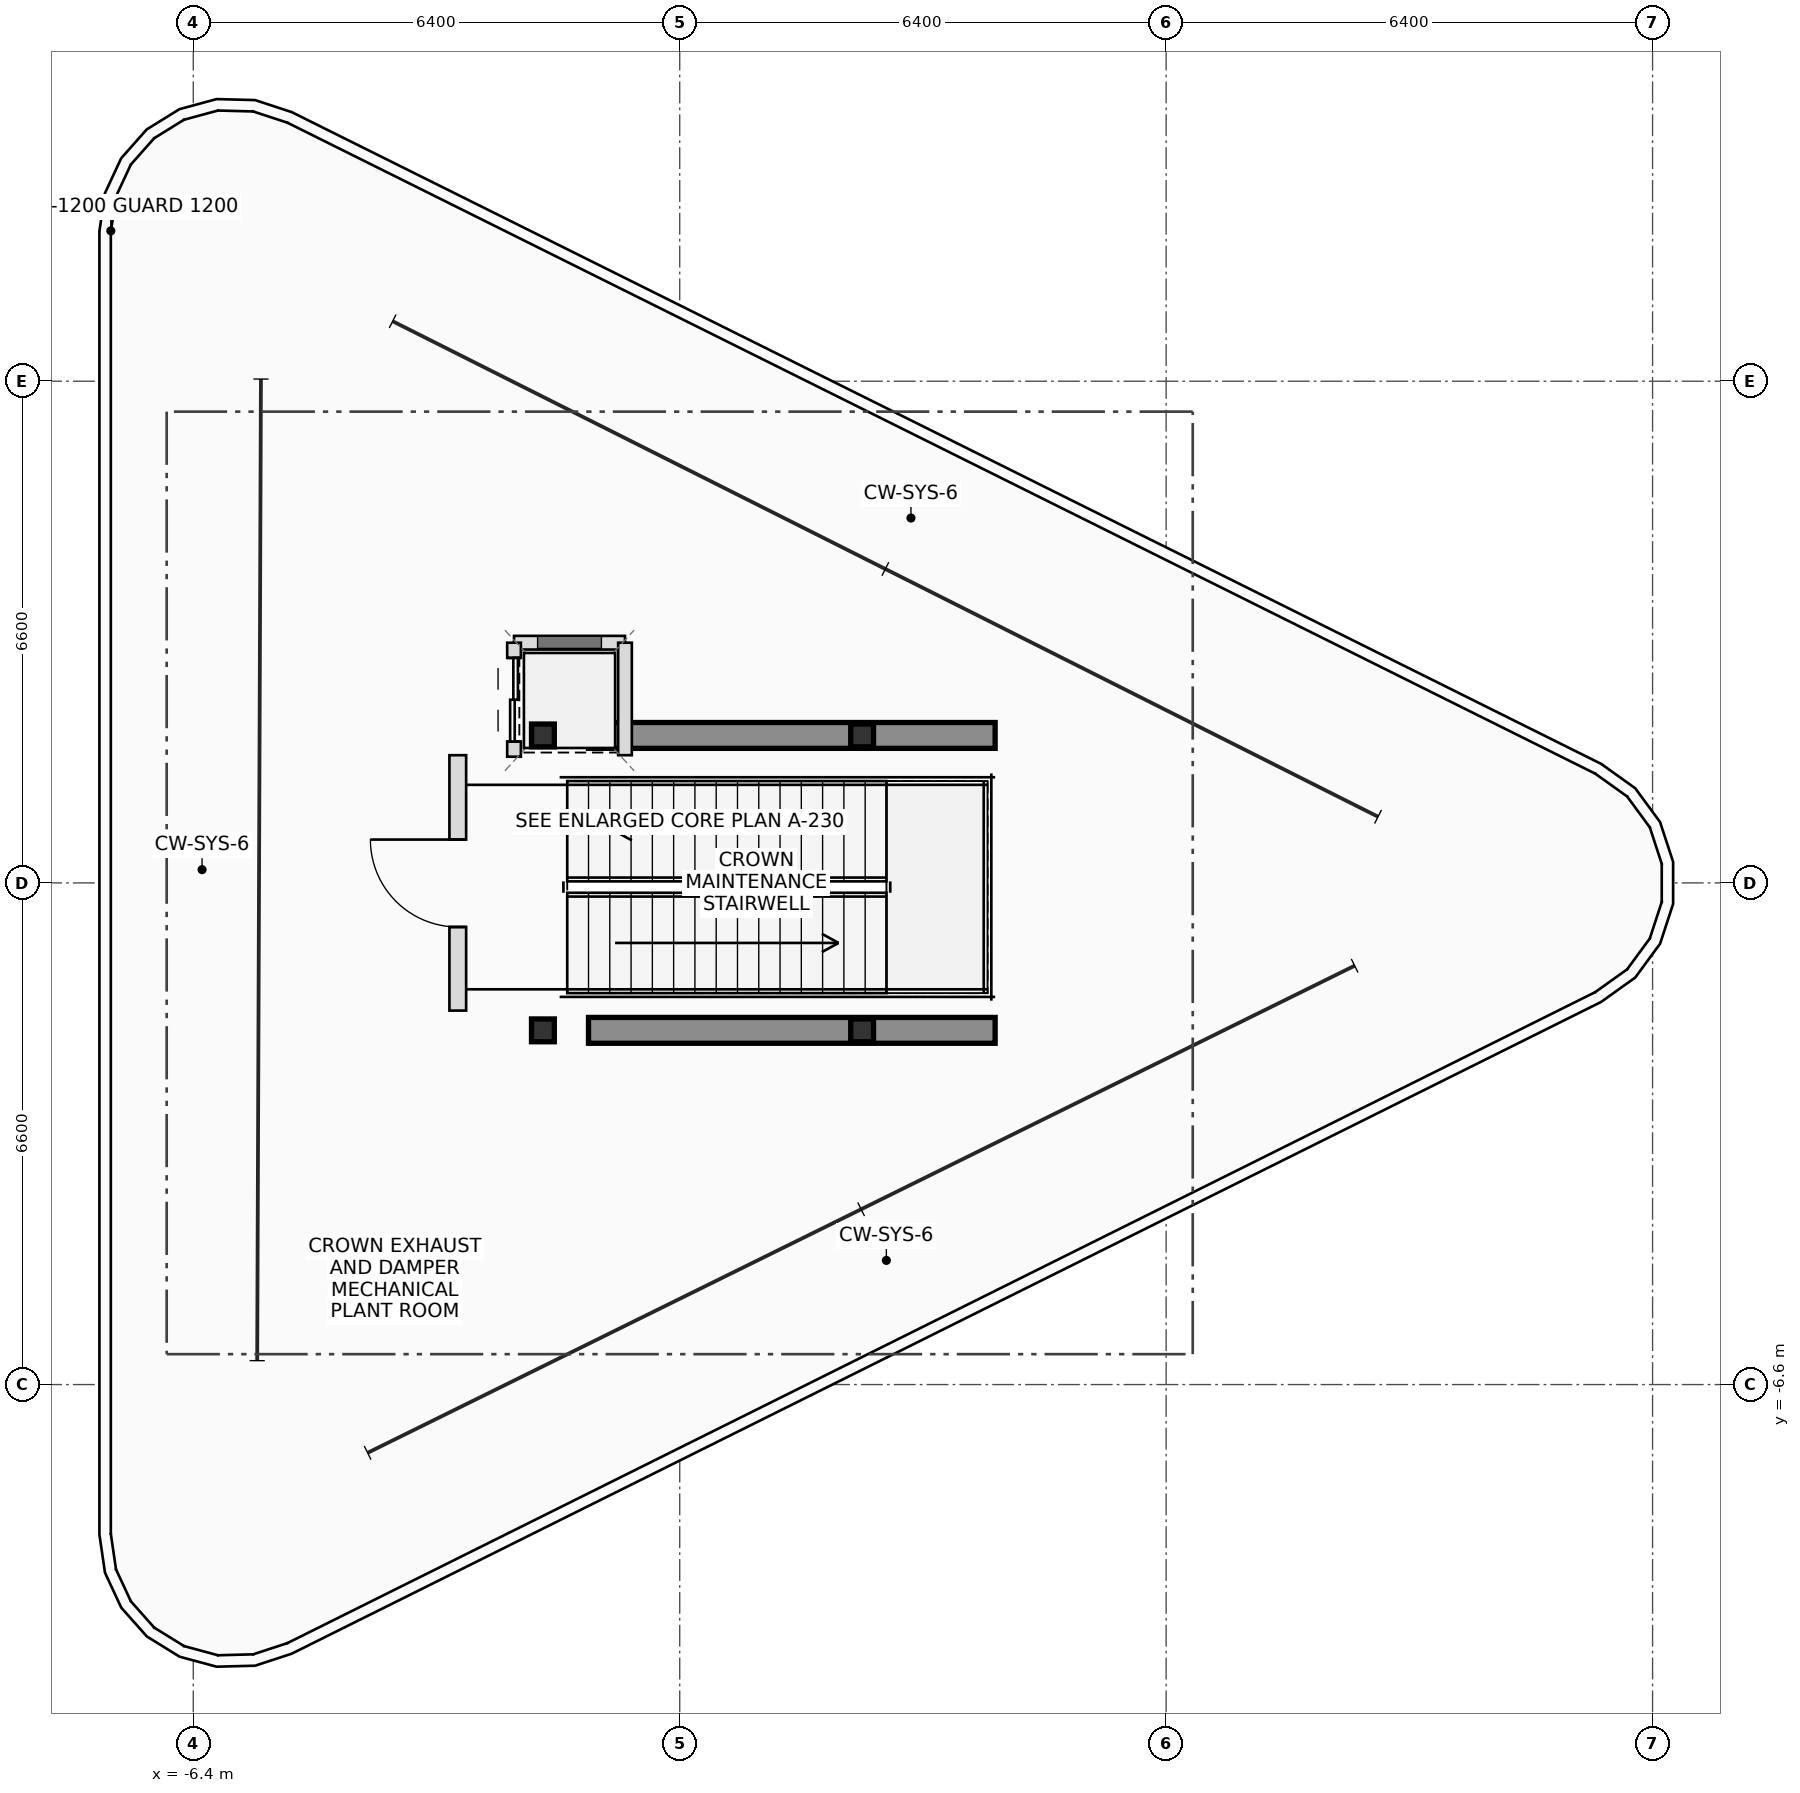
"""IFC4 building model, lengths in metres.
Left out: names, types, materials, properties, quantities, classifications, styles, units other than length and angle.
Written with IfcOpenShell. Run it as: python <this file> out.ifc"""

import sys

from ifc_helpers import new_model, si_unit, direction, frame, frame_2d, origin, origin_2d, place, context, subcontext, project, spatial, rectangle, i_section, extrude, source, transform, mapped, element, fill, save


model = new_model("IFC4")
c1 = context("Model", 3, precision=1e-05, world=origin(), true_north=direction((0.0, 1.0)))
c2 = subcontext(c1, "Body", "Model", "MODEL_VIEW")
j1 = project(units=[si_unit("LENGTHUNIT", "METRE"), si_unit("PLANEANGLEUNIT", "RADIAN")], contexts=[c1])
p1 = place(None, origin())
s1 = spatial("IfcSite", under=j1, at=p1, CompositionType="ELEMENT")
p2 = place(p1, origin())
s2 = spatial("IfcBuilding", under=s1, at=p2, CompositionType="ELEMENT")
p3 = place(p2, frame((0.0, 0.0, 333.45)))
s3 = spatial("IfcBuildingStorey", under=s2, at=p3, CompositionType="ELEMENT", Elevation=333.45)
m1 = source(origin(), c2, "Body", "SweptSolid", [
    extrude(i_section(OverallWidth=0.3, OverallDepth=0.3, WebThickness=0.01, FlangeThickness=0.015, FilletRadius=0.018, at=origin_2d()), origin(), (0.0, 0.0, 1.0), 5.2),
])
for number, where, z_axis, x_axis in (
    (1, (-1.8, -1.94, 0.0), (0.0, 0.0, 1.0), (1.0, 0.0, 0.0)),
    (2, (2.4, 1.94, 0.0), (0.0, 0.0, 1.0), (1.0, 0.0, 0.0)),
    (3, (2.4, -1.94, 0.0), (0.0, 0.0, 1.0), (1.0, 0.0, 0.0)),
    (4, (-1.8, 1.94, 0.0), (0.0, 0.0, 1.0), (1.0, 0.0, 0.0)),
):
    element("IfcColumn", number, at=place(p3, frame(where, z_axis=z_axis, x_axis=x_axis)), inside=s3, PredefinedType="COLUMN", context=c2, shape_type="MappedRepresentation", body=[
        mapped(m1, transform((0.0, 0.0, 0.0), scale=1.0)),
    ])
for number, where, z_axis, x_axis in (
    (5, (-1.2, 1.94, 0.0), (0.0, 0.0, 1.0), (1.0, 0.0, 0.0)),
    (6, (-1.2, -1.94, 0.0), (0.0, 0.0, 1.0), (1.0, 0.0, 0.0)),
):
    element("IfcWall", number, at=place(p3, frame(where, z_axis=z_axis, x_axis=x_axis)), inside=s3, PredefinedType="SHEAR", context=c2, shape_type="SweptSolid", body=[
        extrude(rectangle(XDim=5.35, YDim=0.34, at=frame_2d((2.675, 0.0))), origin(), (0.0, 0.0, 1.0), 5.2),
    ])
p4 = place(p3, frame((-2.18, 3.16, 0.0), z_axis=(0.0, 0.0, 1.0), x_axis=(1.0, 0.0, 0.0)))
e7 = element("IfcWall", 7, at=p4, inside=s3, PredefinedType="PLUMBINGWALL", context=c2, shape_type="SweptSolid", body=[
    extrude(rectangle(XDim=1.46, YDim=0.18, at=frame_2d((0.73, 0.0))), origin(), (0.0, 0.0, 1.0), 4.92),
])
p5 = place(p3, frame((-2.18, 1.66, 0.0), z_axis=(0.0, 0.0, 1.0), x_axis=(0.0, 1.0, 0.0)))
e8 = element("IfcWall", 8, at=p5, inside=s3, PredefinedType="PLUMBINGWALL", context=c2, shape_type="SweptSolid", body=[
    extrude(rectangle(XDim=1.5, YDim=0.18, at=frame_2d((0.75, 0.0))), origin(), (0.0, 0.0, 1.0), 4.92),
])
p6 = place(p5, frame((0.2, 0.0, 0.0)))
e9 = element("IfcOpeningElement", 9, at=p6, cuts=e8, PredefinedType="OPENING", context=c2, shape_type="SweptSolid", body=[
    extrude(rectangle(XDim=1.1, YDim=2.2, at=frame_2d((0.55, 1.1))), frame((0.0, 0.1, 0.0), z_axis=(0.0, -1.0, 0.0), x_axis=(1.0, 0.0, 0.0)), (0.0, 0.0, 1.0), 0.2),
])
p7 = place(p3, frame((-0.72, 1.68, 0.0), z_axis=(0.0, 0.0, 1.0), x_axis=(0.0, 1.0, 0.0)))
e10 = element("IfcWall", 10, at=p7, inside=s3, PredefinedType="PLUMBINGWALL", context=c2, shape_type="SweptSolid", body=[
    extrude(rectangle(XDim=1.48, YDim=0.18, at=frame_2d((0.74, 0.0))), origin(), (0.0, 0.0, 1.0), 4.325),
])
p8 = place(p3, frame((-2.92, -1.68, 0.0), z_axis=(0.0, 0.0, 1.0), x_axis=(0.0, 1.0, 0.0)))
e11 = element("IfcWall", 11, at=p8, inside=s3, PredefinedType="PLUMBINGWALL", context=c2, shape_type="SweptSolid", body=[
    extrude(rectangle(XDim=3.36, YDim=0.22, at=frame_2d((1.68, 0.0))), origin(), (0.0, 0.0, 1.0), 4.92),
])
p9 = place(p8, frame((1.1, 0.0, 0.0)))
e12 = element("IfcOpeningElement", 12, at=p9, cuts=e11, PredefinedType="OPENING", context=c2, shape_type="SweptSolid", body=[
    extrude(rectangle(XDim=1.15, YDim=2.15, at=frame_2d((0.575, 1.075))), frame((0.0, 0.12, 0.0), z_axis=(0.0, -1.0, 0.0), x_axis=(1.0, 0.0, 0.0)), (0.0, 0.0, 1.0), 0.24),
])
p10 = place(p6, origin())
e13 = element("IfcDoor", 13, at=p10, inside=s3, OperationType="DOUBLE_DOOR_SLIDING", PredefinedType="DOOR", context=c2, shape_type="SweptSolid", body=[
    extrude(rectangle(XDim=1.1, YDim=2.2, at=frame_2d((0.55, 1.1))), frame((0.0, 0.025, 0.0), z_axis=(0.0, -1.0, 0.0), x_axis=(1.0, 0.0, 0.0)), (0.0, 0.0, 1.0), 0.05),
])
fill(e9, e13)
p11 = place(p9, origin())
e14 = element("IfcDoor", 14, at=p11, inside=s3, OperationType="SINGLE_SWING_RIGHT", PredefinedType="DOOR", context=c2, shape_type="SweptSolid", body=[
    extrude(rectangle(XDim=1.15, YDim=2.15, at=frame_2d((0.575, 1.075))), frame((0.0, 0.025, 0.0), z_axis=(0.0, -1.0, 0.0), x_axis=(1.0, 0.0, 0.0)), (0.0, 0.0, 1.0), 0.05),
])
fill(e12, e14)
save(model, sys.argv[1])
